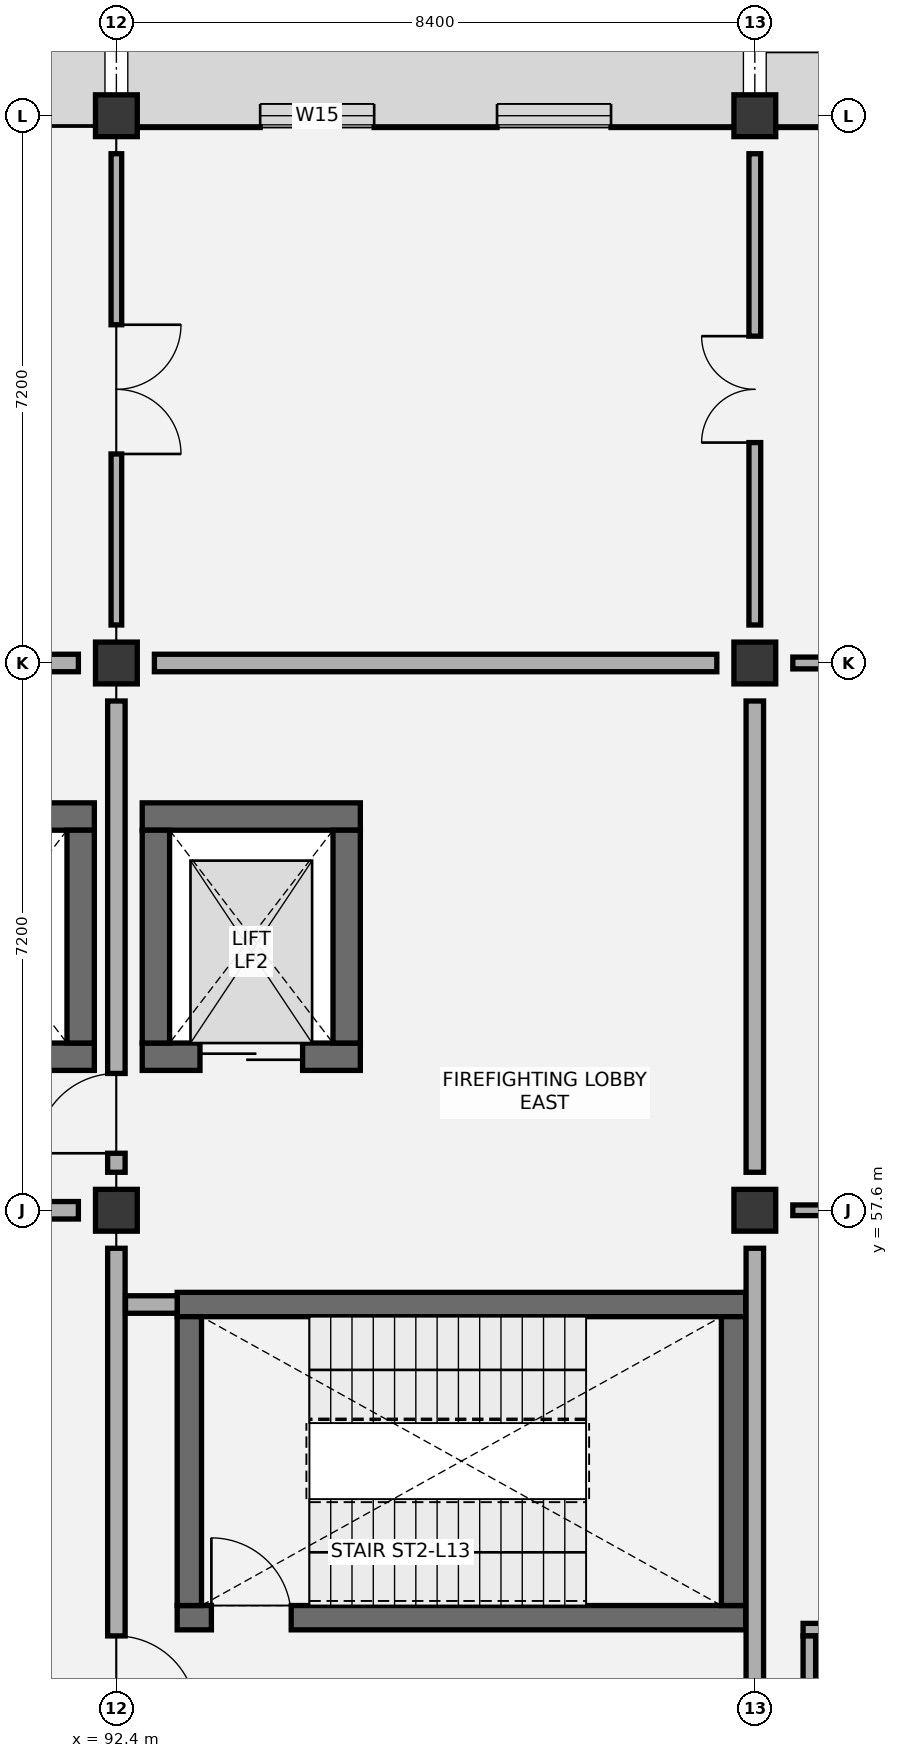
"""IFC4 building model, lengths in metres.
Left out: names, types, materials, properties, quantities, classifications, styles, units other than length and angle.
Written with IfcOpenShell. Run it as: python <this file> out.ifc"""

import sys

from ifc_helpers import new_model, si_unit, direction, frame, frame_2d, origin, origin_2d, place, context, subcontext, project, spatial, rectangle, extrude, element, fill, save


model = new_model("IFC4")
c1 = context("Model", 3, precision=1e-05, world=origin(), true_north=direction((0.0, 1.0)))
c2 = subcontext(c1, "Body", "Model", "MODEL_VIEW")
j1 = project(units=[si_unit("LENGTHUNIT", "METRE"), si_unit("PLANEANGLEUNIT", "RADIAN")], contexts=[c1])
p1 = place(None, origin())
s1 = spatial("IfcSite", under=j1, at=p1, CompositionType="ELEMENT")
p2 = place(p1, origin())
s2 = spatial("IfcBuilding", under=s1, at=p2, CompositionType="ELEMENT")
p3 = place(p2, frame((0.0, 0.0, 60.6)))
s3 = spatial("IfcBuildingStorey", under=s2, at=p3, CompositionType="ELEMENT", Elevation=60.6)
for number, where, z_axis, x_axis in (
    (1, (92.4, 57.6, 0.0), (0.0, 0.0, 1.0), (1.0, 0.0, 0.0)),
    (2, (92.4, 64.8, 0.0), (0.0, 0.0, 1.0), (1.0, 0.0, 0.0)),
    (3, (92.4, 72.0, 0.0), (0.0, 0.0, 1.0), (1.0, 0.0, 0.0)),
    (4, (100.8, 57.6, 0.0), (0.0, 0.0, 1.0), (1.0, 0.0, 0.0)),
    (5, (100.8, 64.8, 0.0), (0.0, 0.0, 1.0), (1.0, 0.0, 0.0)),
    (6, (100.8, 72.0, 0.0), (0.0, 0.0, 1.0), (1.0, 0.0, 0.0)),
):
    element("IfcColumn", number, at=place(p3, frame(where, z_axis=z_axis, x_axis=x_axis)), inside=s3, PredefinedType="COLUMN", context=c2, shape_type="SweptSolid", body=[
        extrude(rectangle(XDim=0.55, YDim=0.55, at=origin_2d()), origin(), (0.0, 0.0, 1.0), 4.2),
    ])
p4 = place(p3, frame((93.2, 52.24, 0.0), z_axis=(0.0, 0.0, 1.0), x_axis=(1.0, 0.0, 0.0)))
e7 = element("IfcWall", 7, at=p4, inside=s3, PredefinedType="SHEAR", context=c2, shape_type="SweptSolid", body=[
    extrude(rectangle(XDim=7.48, YDim=0.32, at=frame_2d((3.74, 0.0))), origin(), (0.0, 0.0, 1.0), 3.95),
])
p5 = place(p4, frame((0.45, 0.0, 0.0)))
e8 = element("IfcOpeningElement", 8, at=p5, cuts=e7, PredefinedType="OPENING", context=c2, shape_type="SweptSolid", body=[
    extrude(rectangle(XDim=1.05, YDim=2.15, at=frame_2d((0.525, 1.075))), frame((0.0, 0.17, 0.0), z_axis=(0.0, -1.0, 0.0), x_axis=(1.0, 0.0, 0.0)), (0.0, 0.0, 1.0), 0.34),
])
p6 = place(p3, frame((93.2, 56.36, 0.0), z_axis=(0.0, 0.0, 1.0), x_axis=(1.0, 0.0, 0.0)))
e9 = element("IfcWall", 9, at=p6, inside=s3, PredefinedType="SHEAR", context=c2, shape_type="SweptSolid", body=[
    extrude(rectangle(XDim=7.48, YDim=0.32, at=frame_2d((3.74, 0.0))), origin(), (0.0, 0.0, 1.0), 3.95),
])
for number, where, z_axis, x_axis in (
    (10, (93.36, 52.4, 0.0), (0.0, 0.0, 1.0), (0.0, 1.0, 0.0)),
    (11, (100.52, 52.4, 0.0), (0.0, 0.0, 1.0), (0.0, 1.0, 0.0)),
):
    element("IfcWall", number, at=place(p3, frame(where, z_axis=z_axis, x_axis=x_axis)), inside=s3, PredefinedType="SHEAR", context=c2, shape_type="SweptSolid", body=[
        extrude(rectangle(XDim=3.8, YDim=0.32, at=frame_2d((1.9, 0.0))), origin(), (0.0, 0.0, 1.0), 3.95),
    ])
p7 = place(p3, frame((84.34, 62.78, 0.0), z_axis=(0.0, 0.0, 1.0), x_axis=(1.0, 0.0, 0.0)))
e12 = element("IfcWall", 12, at=p7, inside=s3, PredefinedType="SHEAR", context=c2, shape_type="SweptSolid", body=[
    extrude(rectangle(XDim=7.77, YDim=0.36, at=frame_2d((3.885, 0.0))), origin(), (0.0, 0.0, 1.0), 3.95),
])
p8 = place(p3, frame((89.45, 59.62, 0.0), z_axis=(0.0, 0.0, 1.0), x_axis=(1.0, 0.0, 0.0)))
e13 = element("IfcWall", 13, at=p8, inside=s3, PredefinedType="SHEAR", context=c2, shape_type="SweptSolid", body=[
    extrude(rectangle(XDim=2.66, YDim=0.36, at=frame_2d((1.33, 0.0))), origin(), (0.0, 0.0, 1.0), 3.95),
])
p9 = place(p8, frame((0.78, 0.0, 0.0)))
e14 = element("IfcOpeningElement", 14, at=p9, cuts=e13, PredefinedType="OPENING", context=c2, shape_type="SweptSolid", body=[
    extrude(rectangle(XDim=1.1, YDim=2.15, at=frame_2d((0.55, 1.075))), frame((0.0, 0.19, 0.0), z_axis=(0.0, -1.0, 0.0), x_axis=(1.0, 0.0, 0.0)), (0.0, 0.0, 1.0), 0.38),
])
p10 = place(p3, frame((91.93, 59.8, 0.0), z_axis=(0.0, 0.0, 1.0), x_axis=(0.0, 1.0, 0.0)))
e15 = element("IfcWall", 15, at=p10, inside=s3, PredefinedType="SHEAR", context=c2, shape_type="SweptSolid", body=[
    extrude(rectangle(XDim=2.8, YDim=0.36, at=frame_2d((1.4, 0.0))), origin(), (0.0, 0.0, 1.0), 3.95),
])
p11 = place(p3, frame((92.74, 62.78, 0.0), z_axis=(0.0, 0.0, 1.0), x_axis=(1.0, 0.0, 0.0)))
e16 = element("IfcWall", 16, at=p11, inside=s3, PredefinedType="SHEAR", context=c2, shape_type="SweptSolid", body=[
    extrude(rectangle(XDim=2.87, YDim=0.36, at=frame_2d((1.435, 0.0))), origin(), (0.0, 0.0, 1.0), 3.95),
])
p12 = place(p3, frame((92.74, 59.62, 0.0), z_axis=(0.0, 0.0, 1.0), x_axis=(1.0, 0.0, 0.0)))
e17 = element("IfcWall", 17, at=p12, inside=s3, PredefinedType="SHEAR", context=c2, shape_type="SweptSolid", body=[
    extrude(rectangle(XDim=2.87, YDim=0.36, at=frame_2d((1.435, 0.0))), origin(), (0.0, 0.0, 1.0), 3.95),
])
p13 = place(p12, frame((0.76, 0.0, 0.0)))
e18 = element("IfcOpeningElement", 18, at=p13, cuts=e17, PredefinedType="OPENING", context=c2, shape_type="SweptSolid", body=[
    extrude(rectangle(XDim=1.35, YDim=2.2, at=frame_2d((0.675, 1.1))), frame((0.0, 0.19, 0.0), z_axis=(0.0, -1.0, 0.0), x_axis=(1.0, 0.0, 0.0)), (0.0, 0.0, 1.0), 0.38),
])
for number, where, z_axis, x_axis in (
    (19, (92.92, 59.8, 0.0), (0.0, 0.0, 1.0), (0.0, 1.0, 0.0)),
    (20, (95.43, 59.8, 0.0), (0.0, 0.0, 1.0), (0.0, 1.0, 0.0)),
):
    element("IfcWall", number, at=place(p3, frame(where, z_axis=z_axis, x_axis=x_axis)), inside=s3, PredefinedType="SHEAR", context=c2, shape_type="SweptSolid", body=[
        extrude(rectangle(XDim=2.8, YDim=0.36, at=frame_2d((1.4, 0.0))), origin(), (0.0, 0.0, 1.0), 3.95),
    ])
p14 = place(p3, frame((84.275, 72.0, 0.0), z_axis=(0.0, 0.0, 1.0), x_axis=(1.0, 0.0, 0.0)))
e21 = element("IfcWall", 21, at=p14, inside=s3, PredefinedType="SOLIDWALL", context=c2, shape_type="SweptSolid", body=[
    extrude(rectangle(XDim=7.85, YDim=0.25, at=frame_2d((3.925, 0.0))), origin(), (0.0, 0.0, 1.0), 3.445),
])
p15 = place(p14, frame((0.817, 0.0, 0.95)))
e22 = element("IfcOpeningElement", 22, at=p15, cuts=e21, PredefinedType="OPENING", context=c2, shape_type="SweptSolid", body=[
    extrude(rectangle(XDim=2.7, YDim=1.65, at=frame_2d((1.35, 0.825))), frame((0.0, 0.135, 0.0), z_axis=(0.0, -1.0, 0.0), x_axis=(1.0, 0.0, 0.0)), (0.0, 0.0, 1.0), 0.27),
])
p16 = place(p14, frame((4.333, 0.0, 0.95)))
e23 = element("IfcOpeningElement", 23, at=p16, cuts=e21, PredefinedType="OPENING", context=c2, shape_type="SweptSolid", body=[
    extrude(rectangle(XDim=2.7, YDim=1.65, at=frame_2d((1.35, 0.825))), frame((0.0, 0.135, 0.0), z_axis=(0.0, -1.0, 0.0), x_axis=(1.0, 0.0, 0.0)), (0.0, 0.0, 1.0), 0.27),
])
p17 = place(p3, frame((92.675, 72.0, 0.0), z_axis=(0.0, 0.0, 1.0), x_axis=(1.0, 0.0, 0.0)))
e24 = element("IfcWall", 24, at=p17, inside=s3, PredefinedType="SOLIDWALL", context=c2, shape_type="SweptSolid", body=[
    extrude(rectangle(XDim=7.85, YDim=0.31, at=frame_2d((3.925, 0.0))), origin(), (0.0, 0.0, 1.0), 3.445),
])
p18 = place(p17, frame((1.617, 0.0, 0.95)))
e25 = element("IfcOpeningElement", 25, at=p18, cuts=e24, PredefinedType="OPENING", context=c2, shape_type="SweptSolid", body=[
    extrude(rectangle(XDim=1.5, YDim=1.5, at=frame_2d((0.75, 0.75))), frame((0.0, 0.165, 0.0), z_axis=(0.0, -1.0, 0.0), x_axis=(1.0, 0.0, 0.0)), (0.0, 0.0, 1.0), 0.33),
])
p19 = place(p17, frame((4.733, 0.0, 0.95)))
e26 = element("IfcOpeningElement", 26, at=p19, cuts=e24, PredefinedType="OPENING", context=c2, shape_type="SweptSolid", body=[
    extrude(rectangle(XDim=1.5, YDim=1.5, at=frame_2d((0.75, 0.75))), frame((0.0, 0.165, 0.0), z_axis=(0.0, -1.0, 0.0), x_axis=(1.0, 0.0, 0.0)), (0.0, 0.0, 1.0), 0.33),
])
p20 = place(p3, frame((101.075, 72.0, 0.0), z_axis=(0.0, 0.0, 1.0), x_axis=(1.0, 0.0, 0.0)))
e27 = element("IfcWall", 27, at=p20, inside=s3, PredefinedType="SOLIDWALL", context=c2, shape_type="SweptSolid", body=[
    extrude(rectangle(XDim=7.85, YDim=0.31, at=frame_2d((3.925, 0.0))), origin(), (0.0, 0.0, 1.0), 3.445),
])
p21 = place(p20, frame((1.717, 0.0, 0.95)))
e28 = element("IfcOpeningElement", 28, at=p21, cuts=e27, PredefinedType="OPENING", context=c2, shape_type="SweptSolid", body=[
    extrude(rectangle(XDim=1.35, YDim=1.65, at=frame_2d((0.675, 0.825))), frame((0.0, 0.165, 0.0), z_axis=(0.0, -1.0, 0.0), x_axis=(1.0, 0.0, 0.0)), (0.0, 0.0, 1.0), 0.33),
])
p22 = place(p20, frame((4.783, 0.0, 0.95)))
e29 = element("IfcOpeningElement", 29, at=p22, cuts=e27, PredefinedType="OPENING", context=c2, shape_type="SweptSolid", body=[
    extrude(rectangle(XDim=1.35, YDim=1.65, at=frame_2d((0.675, 0.825))), frame((0.0, 0.165, 0.0), z_axis=(0.0, -1.0, 0.0), x_axis=(1.0, 0.0, 0.0)), (0.0, 0.0, 1.0), 0.33),
])
p23 = place(p3, frame((101.435, 52.083, 0.0), z_axis=(0.0, 0.0, 1.0), x_axis=(1.0, 0.0, 0.0)))
e30 = element("IfcWall", 30, at=p23, inside=s3, PredefinedType="PARTITIONING", context=c2, shape_type="SweptSolid", body=[
    extrude(rectangle(XDim=1.43, YDim=0.165, at=frame_2d((0.715, 0.0))), origin(), (0.0, 0.0, 1.0), 3.95),
])
p24 = place(p3, frame((101.518, 51.2, 0.0), z_axis=(0.0, 0.0, 1.0), x_axis=(0.0, 1.0, 0.0)))
e31 = element("IfcWall", 31, at=p24, inside=s3, PredefinedType="PARTITIONING", context=c2, shape_type="SweptSolid", body=[
    extrude(rectangle(XDim=0.8, YDim=0.165, at=frame_2d((0.4, 0.0))), origin(), (0.0, 0.0, 1.0), 3.95),
])
p25 = place(p3, frame((92.4, 50.9, 0.0), z_axis=(0.0, 0.0, 1.0), x_axis=(0.0, 1.0, 0.0)))
e32 = element("IfcWall", 32, at=p25, inside=s3, PredefinedType="PARTITIONING", context=c2, shape_type="SweptSolid", body=[
    extrude(rectangle(XDim=6.2, YDim=0.23, at=frame_2d((3.1, 0.0))), origin(), (0.0, 0.0, 1.0), 3.445),
])
p26 = place(p25, frame((0.05, 0.0, 0.0)))
e33 = element("IfcOpeningElement", 33, at=p26, cuts=e32, PredefinedType="OPENING", context=c2, shape_type="SweptSolid", body=[
    extrude(rectangle(XDim=1.05, YDim=2.15, at=frame_2d((0.525, 1.075))), frame((0.0, 0.125, 0.0), z_axis=(0.0, -1.0, 0.0), x_axis=(1.0, 0.0, 0.0)), (0.0, 0.0, 1.0), 0.25),
])
p27 = place(p3, frame((84.5, 57.6, 0.0), z_axis=(0.0, 0.0, 1.0), x_axis=(1.0, 0.0, 0.0)))
e34 = element("IfcWall", 34, at=p27, inside=s3, PredefinedType="PARTITIONING", context=c2, shape_type="SweptSolid", body=[
    extrude(rectangle(XDim=7.4, YDim=0.23, at=frame_2d((3.7, 0.0))), origin(), (0.0, 0.0, 1.0), 3.595),
])
p28 = place(p27, frame((2.95, 0.0, 0.0)))
e35 = element("IfcOpeningElement", 35, at=p28, cuts=e34, PredefinedType="OPENING", context=c2, shape_type="SweptSolid", body=[
    extrude(rectangle(XDim=1.5, YDim=2.15, at=frame_2d((0.75, 1.075))), frame((0.0, 0.125, 0.0), z_axis=(0.0, -1.0, 0.0), x_axis=(1.0, 0.0, 0.0)), (0.0, 0.0, 1.0), 0.25),
])
p29 = place(p3, frame((92.4, 58.1, 0.0), z_axis=(0.0, 0.0, 1.0), x_axis=(0.0, 1.0, 0.0)))
e36 = element("IfcWall", 36, at=p29, inside=s3, PredefinedType="PARTITIONING", context=c2, shape_type="SweptSolid", body=[
    extrude(rectangle(XDim=6.2, YDim=0.23, at=frame_2d((3.1, 0.0))), origin(), (0.0, 0.0, 1.0), 3.655),
])
p30 = place(p29, frame((0.25, 0.0, 0.0)))
e37 = element("IfcOpeningElement", 37, at=p30, cuts=e36, PredefinedType="OPENING", context=c2, shape_type="SweptSolid", body=[
    extrude(rectangle(XDim=1.05, YDim=2.15, at=frame_2d((0.525, 1.075))), frame((0.0, 0.125, 0.0), z_axis=(0.0, -1.0, 0.0), x_axis=(1.0, 0.0, 0.0)), (0.0, 0.0, 1.0), 0.25),
])
p31 = place(p3, frame((84.5, 64.8, 0.0), z_axis=(0.0, 0.0, 1.0), x_axis=(1.0, 0.0, 0.0)))
e38 = element("IfcWall", 38, at=p31, inside=s3, PredefinedType="PARTITIONING", context=c2, shape_type="SweptSolid", body=[
    extrude(rectangle(XDim=7.4, YDim=0.23, at=frame_2d((3.7, 0.0))), origin(), (0.0, 0.0, 1.0), 3.595),
])
p32 = place(p3, frame((92.4, 65.3, 0.0), z_axis=(0.0, 0.0, 1.0), x_axis=(0.0, 1.0, 0.0)))
e39 = element("IfcWall", 39, at=p32, inside=s3, PredefinedType="PARTITIONING", context=c2, shape_type="SweptSolid", body=[
    extrude(rectangle(XDim=6.2, YDim=0.14, at=frame_2d((3.1, 0.0))), origin(), (0.0, 0.0, 1.0), 3.495),
])
p33 = place(p32, frame((2.25, 0.0, 0.0)))
e40 = element("IfcOpeningElement", 40, at=p33, cuts=e39, PredefinedType="OPENING", context=c2, shape_type="SweptSolid", body=[
    extrude(rectangle(XDim=1.7, YDim=2.25, at=frame_2d((0.85, 1.125))), frame((0.0, 0.08, 0.0), z_axis=(0.0, -1.0, 0.0), x_axis=(1.0, 0.0, 0.0)), (0.0, 0.0, 1.0), 0.16),
])
p34 = place(p3, frame((100.8, 50.9, 0.0), z_axis=(0.0, 0.0, 1.0), x_axis=(0.0, 1.0, 0.0)))
e41 = element("IfcWall", 41, at=p34, inside=s3, PredefinedType="PARTITIONING", context=c2, shape_type="SweptSolid", body=[
    extrude(rectangle(XDim=6.2, YDim=0.23, at=frame_2d((3.1, 0.0))), origin(), (0.0, 0.0, 1.0), 3.655),
])
p35 = place(p3, frame((92.52, 56.36, 0.0), z_axis=(0.0, 0.0, 1.0), x_axis=(1.0, 0.0, 0.0)))
e42 = element("IfcWall", 42, at=p35, inside=s3, PredefinedType="PARTITIONING", context=c2, shape_type="SweptSolid", body=[
    extrude(rectangle(XDim=0.68, YDim=0.23, at=frame_2d((0.34, 0.0))), origin(), (0.0, 0.0, 1.0), 3.95),
])
p36 = place(p3, frame((100.8, 58.1, 0.0), z_axis=(0.0, 0.0, 1.0), x_axis=(0.0, 1.0, 0.0)))
e43 = element("IfcWall", 43, at=p36, inside=s3, PredefinedType="PARTITIONING", context=c2, shape_type="SweptSolid", body=[
    extrude(rectangle(XDim=6.2, YDim=0.23, at=frame_2d((3.1, 0.0))), origin(), (0.0, 0.0, 1.0), 3.445),
])
p37 = place(p3, frame((92.9, 64.8, 0.0), z_axis=(0.0, 0.0, 1.0), x_axis=(1.0, 0.0, 0.0)))
e44 = element("IfcWall", 44, at=p37, inside=s3, PredefinedType="PARTITIONING", context=c2, shape_type="SweptSolid", body=[
    extrude(rectangle(XDim=7.4, YDim=0.23, at=frame_2d((3.7, 0.0))), origin(), (0.0, 0.0, 1.0), 3.655),
])
p38 = place(p3, frame((100.8, 65.3, 0.0), z_axis=(0.0, 0.0, 1.0), x_axis=(0.0, 1.0, 0.0)))
e45 = element("IfcWall", 45, at=p38, inside=s3, PredefinedType="PARTITIONING", context=c2, shape_type="SweptSolid", body=[
    extrude(rectangle(XDim=6.2, YDim=0.155, at=frame_2d((3.1, 0.0))), origin(), (0.0, 0.0, 1.0), 3.495),
])
p39 = place(p38, frame((2.4, 0.0, 0.0)))
e46 = element("IfcOpeningElement", 46, at=p39, cuts=e45, PredefinedType="OPENING", context=c2, shape_type="SweptSolid", body=[
    extrude(rectangle(XDim=1.4, YDim=2.15, at=frame_2d((0.7, 1.075))), frame((0.0, 0.087, 0.0), z_axis=(0.0, -1.0, 0.0), x_axis=(1.0, 0.0, 0.0)), (0.0, 0.0, 1.0), 0.175),
])
p40 = place(p3, frame((101.3, 57.6, 0.0), z_axis=(0.0, 0.0, 1.0), x_axis=(1.0, 0.0, 0.0)))
e47 = element("IfcWall", 47, at=p40, inside=s3, PredefinedType="PARTITIONING", context=c2, shape_type="SweptSolid", body=[
    extrude(rectangle(XDim=7.4, YDim=0.14, at=frame_2d((3.7, 0.0))), origin(), (0.0, 0.0, 1.0), 3.675),
])
p41 = place(p40, frame((3.125, 0.0, 0.0)))
e48 = element("IfcOpeningElement", 48, at=p41, cuts=e47, PredefinedType="OPENING", context=c2, shape_type="SweptSolid", body=[
    extrude(rectangle(XDim=1.15, YDim=2.1, at=frame_2d((0.575, 1.05))), frame((0.0, 0.08, 0.0), z_axis=(0.0, -1.0, 0.0), x_axis=(1.0, 0.0, 0.0)), (0.0, 0.0, 1.0), 0.16),
])
p42 = place(p3, frame((101.3, 64.8, 0.0), z_axis=(0.0, 0.0, 1.0), x_axis=(1.0, 0.0, 0.0)))
e49 = element("IfcWall", 49, at=p42, inside=s3, PredefinedType="PARTITIONING", context=c2, shape_type="SweptSolid", body=[
    extrude(rectangle(XDim=7.4, YDim=0.155, at=frame_2d((3.7, 0.0))), origin(), (0.0, 0.0, 1.0), 3.675),
])
p43 = place(p42, frame((2.85, 0.0, 0.0)))
e50 = element("IfcOpeningElement", 50, at=p43, cuts=e49, PredefinedType="OPENING", context=c2, shape_type="SweptSolid", body=[
    extrude(rectangle(XDim=1.7, YDim=2.25, at=frame_2d((0.85, 1.125))), frame((0.0, 0.087, 0.0), z_axis=(0.0, -1.0, 0.0), x_axis=(1.0, 0.0, 0.0)), (0.0, 0.0, 1.0), 0.175),
])
p44 = place(p18, origin())
e51 = element("IfcWindow", 51, at=p44, inside=s3, PartitioningType="SINGLE_PANEL", PredefinedType="WINDOW", context=c2, shape_type="SweptSolid", body=[
    extrude(rectangle(XDim=1.5, YDim=1.5, at=frame_2d((0.75, 0.75))), frame((0.0, 0.03, 0.0), z_axis=(0.0, -1.0, 0.0), x_axis=(1.0, 0.0, 0.0)), (0.0, 0.0, 1.0), 0.06),
])
fill(e25, e51)
p45 = place(p19, origin())
e52 = element("IfcWindow", 52, at=p45, inside=s3, PartitioningType="SINGLE_PANEL", PredefinedType="WINDOW", context=c2, shape_type="SweptSolid", body=[
    extrude(rectangle(XDim=1.5, YDim=1.5, at=frame_2d((0.75, 0.75))), frame((0.0, 0.03, 0.0), z_axis=(0.0, -1.0, 0.0), x_axis=(1.0, 0.0, 0.0)), (0.0, 0.0, 1.0), 0.06),
])
fill(e26, e52)
p46 = place(p5, origin())
e53 = element("IfcDoor", 53, at=p46, inside=s3, OperationType="SINGLE_SWING_LEFT", PredefinedType="DOOR", context=c2, shape_type="SweptSolid", body=[
    extrude(rectangle(XDim=1.05, YDim=2.15, at=frame_2d((0.525, 1.075))), frame((0.0, 0.025, 0.0), z_axis=(0.0, -1.0, 0.0), x_axis=(1.0, 0.0, 0.0)), (0.0, 0.0, 1.0), 0.05),
])
fill(e8, e53)
p47 = place(p13, origin())
e54 = element("IfcDoor", 54, at=p47, inside=s3, OperationType="DOUBLE_DOOR_SLIDING", PredefinedType="DOOR", context=c2, shape_type="SweptSolid", body=[
    extrude(rectangle(XDim=1.35, YDim=2.2, at=frame_2d((0.675, 1.1))), frame((0.0, 0.025, 0.0), z_axis=(0.0, -1.0, 0.0), x_axis=(1.0, 0.0, 0.0)), (0.0, 0.0, 1.0), 0.05),
])
fill(e18, e54)
p48 = place(p26, frame((1.05, 0.0, 0.0), z_axis=(0.0, 0.0, 1.0), x_axis=(-1.0, 0.0, 0.0)))
e55 = element("IfcDoor", 55, at=p48, inside=s3, OperationType="SINGLE_SWING_RIGHT", PredefinedType="DOOR", context=c2, shape_type="SweptSolid", body=[
    extrude(rectangle(XDim=1.05, YDim=2.15, at=frame_2d((0.525, 1.075))), frame((0.0, 0.025, 0.0), z_axis=(0.0, -1.0, 0.0), x_axis=(1.0, 0.0, 0.0)), (0.0, 0.0, 1.0), 0.05),
])
fill(e33, e55)
p49 = place(p30, origin())
e56 = element("IfcDoor", 56, at=p49, inside=s3, OperationType="SINGLE_SWING_LEFT", PredefinedType="DOOR", context=c2, shape_type="SweptSolid", body=[
    extrude(rectangle(XDim=1.05, YDim=2.15, at=frame_2d((0.525, 1.075))), frame((0.0, 0.025, 0.0), z_axis=(0.0, -1.0, 0.0), x_axis=(1.0, 0.0, 0.0)), (0.0, 0.0, 1.0), 0.05),
])
fill(e37, e56)
p50 = place(p33, frame((1.7, 0.0, 0.0), z_axis=(0.0, 0.0, 1.0), x_axis=(-1.0, 0.0, 0.0)))
e57 = element("IfcDoor", 57, at=p50, inside=s3, OperationType="DOUBLE_DOOR_SINGLE_SWING", PredefinedType="DOOR", context=c2, shape_type="SweptSolid", body=[
    extrude(rectangle(XDim=1.7, YDim=2.25, at=frame_2d((0.85, 1.125))), frame((0.0, 0.025, 0.0), z_axis=(0.0, -1.0, 0.0), x_axis=(1.0, 0.0, 0.0)), (0.0, 0.0, 1.0), 0.05),
])
fill(e40, e57)
p51 = place(p39, origin())
e58 = element("IfcDoor", 58, at=p51, inside=s3, OperationType="DOUBLE_DOOR_SINGLE_SWING", PredefinedType="DOOR", context=c2, shape_type="SweptSolid", body=[
    extrude(rectangle(XDim=1.4, YDim=2.15, at=frame_2d((0.7, 1.075))), frame((0.0, 0.025, 0.0), z_axis=(0.0, -1.0, 0.0), x_axis=(1.0, 0.0, 0.0)), (0.0, 0.0, 1.0), 0.05),
])
fill(e46, e58)
save(model, sys.argv[1])
